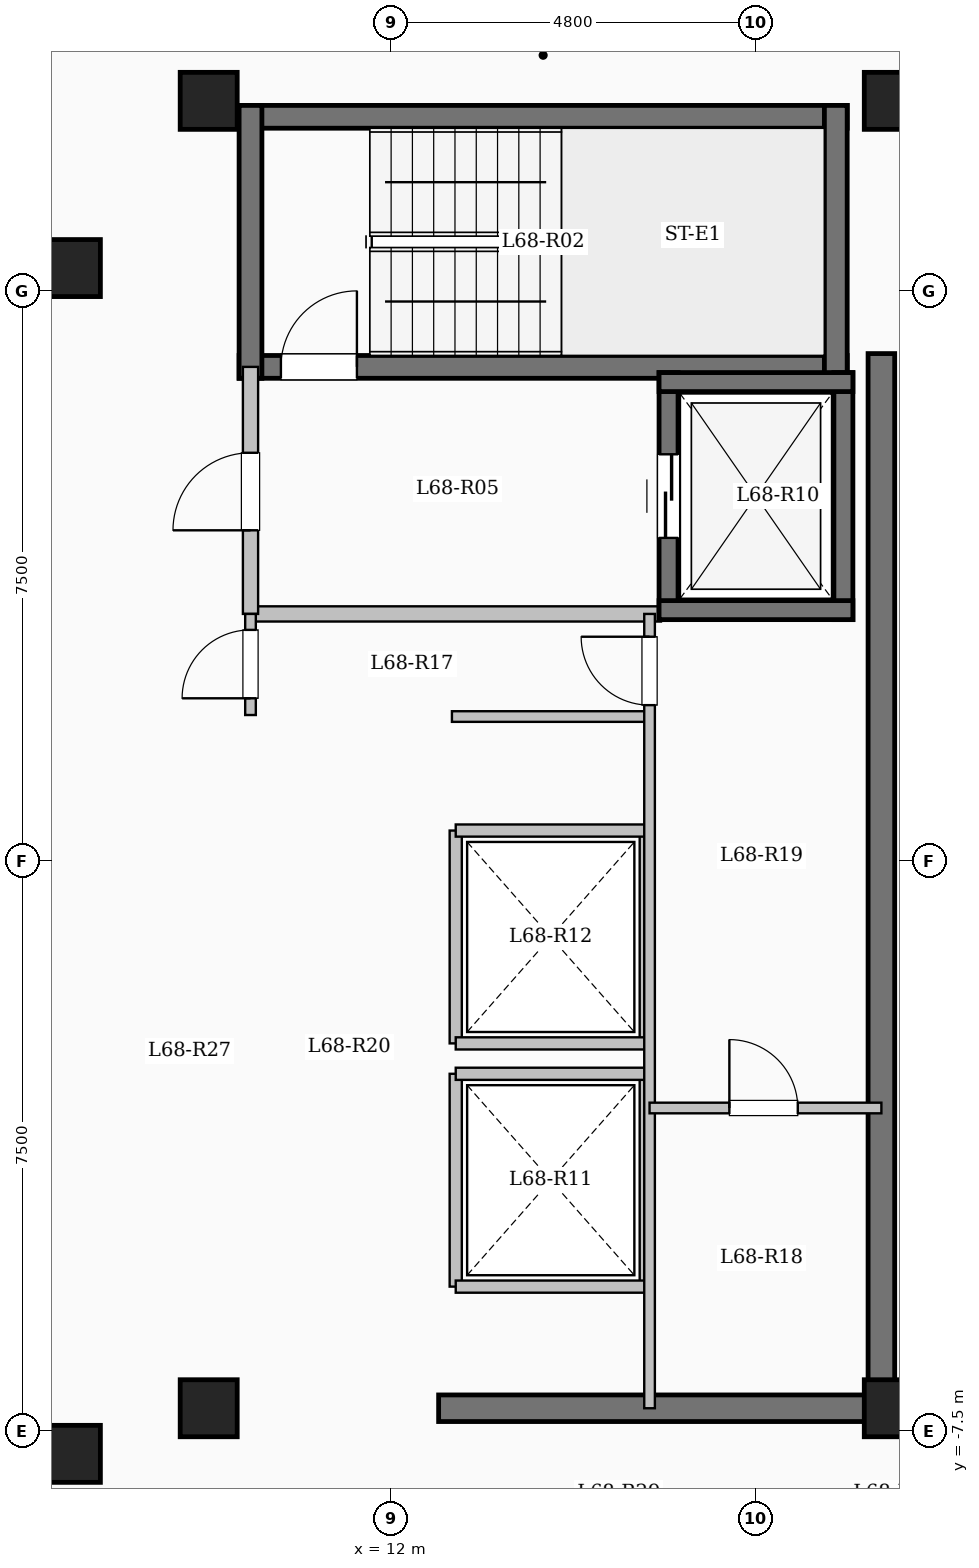
"""IFC4 building model, lengths in metres.
Left out: names, types, materials, properties, quantities, classifications, styles, units other than length and angle.
Written with IfcOpenShell. Run it as: python <this file> out.ifc"""

import sys

from ifc_helpers import new_model, si_unit, direction, frame, frame_2d, origin, origin_2d, place, context, subcontext, project, spatial, rectangle, extrude, element, fill, save


model = new_model("IFC4")
c1 = context("Model", 3, precision=1e-05, world=origin(), true_north=direction((0.0, 1.0)))
c2 = subcontext(c1, "Body", "Model", "MODEL_VIEW")
j1 = project(units=[si_unit("LENGTHUNIT", "METRE"), si_unit("PLANEANGLEUNIT", "RADIAN")], contexts=[c1])
p1 = place(None, origin())
s1 = spatial("IfcSite", under=j1, at=p1, CompositionType="ELEMENT")
p2 = place(p1, origin())
s2 = spatial("IfcBuilding", under=s1, at=p2, CompositionType="ELEMENT")
p3 = place(p2, frame((0.0, 0.0, 251.55)))
s3 = spatial("IfcBuildingStorey", under=s2, at=p3, CompositionType="ELEMENT", Elevation=251.55)
for number, where, z_axis, x_axis in (
    (1, (7.8, -7.8, 0.0), (0.0, 0.0, 1.0), (1.0, 0.0, 0.0)),
    (2, (7.8, 7.8, 0.0), (0.0, 0.0, 1.0), (1.0, 0.0, 0.0)),
    (3, (9.6, -7.2, 0.0), (0.0, 0.0, 1.0), (1.0, 0.0, 0.0)),
    (4, (9.6, 10.0, 0.0), (0.0, 0.0, 1.0), (1.0, 0.0, 0.0)),
    (5, (18.6, -7.2, 0.0), (0.0, 0.0, 1.0), (1.0, 0.0, 0.0)),
    (6, (18.6, 10.0, 0.0), (0.0, 0.0, 1.0), (1.0, 0.0, 0.0)),
):
    element("IfcColumn", number, at=place(p3, frame(where, z_axis=z_axis, x_axis=x_axis)), inside=s3, PredefinedType="COLUMN", context=c2, shape_type="SweptSolid", body=[
        extrude(rectangle(XDim=0.75, YDim=0.75, at=origin_2d()), origin(), (0.0, 0.0, 1.0), 3.35),
    ])
p4 = place(p3, frame((10.0, 9.79, 0.0), z_axis=(0.0, 0.0, 1.0), x_axis=(1.0, 0.0, 0.0)))
e7 = element("IfcWall", 7, at=p4, inside=s3, PredefinedType="SHEAR", context=c2, shape_type="SweptSolid", body=[
    extrude(rectangle(XDim=8.0, YDim=0.3, at=frame_2d((4.0, 0.0))), origin(), (0.0, 0.0, 1.0), 3.35),
])
p5 = place(p3, frame((10.0, 6.5, 0.0), z_axis=(0.0, 0.0, 1.0), x_axis=(1.0, 0.0, 0.0)))
e8 = element("IfcWall", 8, at=p5, inside=s3, PredefinedType="SHEAR", context=c2, shape_type="SweptSolid", body=[
    extrude(rectangle(XDim=8.0, YDim=0.3, at=frame_2d((4.0, 0.0))), origin(), (0.0, 0.0, 1.0), 3.35),
])
p6 = place(p5, frame((0.55, 0.0, 0.0)))
e9 = element("IfcOpeningElement", 9, at=p6, cuts=e8, PredefinedType="OPENING", context=c2, shape_type="SweptSolid", body=[
    extrude(rectangle(XDim=1.0, YDim=2.15, at=frame_2d((0.5, 1.075))), frame((0.0, 0.16, 0.0), z_axis=(0.0, -1.0, 0.0), x_axis=(1.0, 0.0, 0.0)), (0.0, 0.0, 1.0), 0.32),
])
for number, where, z_axis, x_axis in (
    (10, (10.15, 6.35, 0.0), (0.0, 0.0, 1.0), (0.0, 1.0, 0.0)),
    (11, (17.85, 6.35, 0.0), (0.0, 0.0, 1.0), (0.0, 1.0, 0.0)),
):
    element("IfcWall", number, at=place(p3, frame(where, z_axis=z_axis, x_axis=x_axis)), inside=s3, PredefinedType="SHEAR", context=c2, shape_type="SweptSolid", body=[
        extrude(rectangle(XDim=3.59, YDim=0.3, at=frame_2d((1.795, 0.0))), origin(), (0.0, 0.0, 1.0), 3.35),
    ])
p7 = place(p3, frame((10.15, 3.25, 0.0), z_axis=(0.0, 0.0, 1.0), x_axis=(1.0, 0.0, 0.0)))
e12 = element("IfcWall", 12, at=p7, inside=s3, PredefinedType="SOLIDWALL", context=c2, shape_type="SweptSolid", body=[
    extrude(rectangle(XDim=5.4, YDim=0.2, at=frame_2d((2.7, 0.0))), origin(), (0.0, 0.0, 1.0), 3.1),
])
p8 = place(p3, frame((10.15, 3.25, 0.0), z_axis=(0.0, 0.0, 1.0), x_axis=(0.0, 1.0, 0.0)))
e13 = element("IfcWall", 13, at=p8, inside=s3, PredefinedType="SOLIDWALL", context=c2, shape_type="SweptSolid", body=[
    extrude(rectangle(XDim=3.25, YDim=0.2, at=frame_2d((1.625, 0.0))), origin(), (0.0, 0.0, 1.0), 3.1),
])
p9 = place(p8, frame((1.1, 0.0, 0.0)))
e14 = element("IfcOpeningElement", 14, at=p9, cuts=e13, PredefinedType="OPENING", context=c2, shape_type="SweptSolid", body=[
    extrude(rectangle(XDim=1.02, YDim=2.15, at=frame_2d((0.51, 1.075))), frame((0.0, 0.11, 0.0), z_axis=(0.0, -1.0, 0.0), x_axis=(1.0, 0.0, 0.0)), (0.0, 0.0, 1.0), 0.22),
])
p10 = place(p3, frame((15.65, 3.175, 0.0), z_axis=(0.0, 0.0, 1.0), x_axis=(0.0, 1.0, 0.0)))
e15 = element("IfcWall", 15, at=p10, inside=s3, PredefinedType="SHEAR", context=c2, shape_type="SweptSolid", body=[
    extrude(rectangle(XDim=3.25, YDim=0.25, at=frame_2d((1.625, 0.0))), origin(), (0.0, 0.0, 1.0), 3.35),
])
p11 = place(p10, frame((1.075, 0.0, 0.0)))
e16 = element("IfcOpeningElement", 16, at=p11, cuts=e15, PredefinedType="OPENING", context=c2, shape_type="SweptSolid", body=[
    extrude(rectangle(XDim=1.1, YDim=2.15, at=frame_2d((0.55, 1.075))), frame((0.0, 0.135, 0.0), z_axis=(0.0, -1.0, 0.0), x_axis=(1.0, 0.0, 0.0)), (0.0, 0.0, 1.0), 0.27),
])
p12 = place(p3, frame((17.95, 3.175, 0.0), z_axis=(0.0, 0.0, 1.0), x_axis=(0.0, 1.0, 0.0)))
e17 = element("IfcWall", 17, at=p12, inside=s3, PredefinedType="SHEAR", context=c2, shape_type="SweptSolid", body=[
    extrude(rectangle(XDim=3.25, YDim=0.25, at=frame_2d((1.625, 0.0))), origin(), (0.0, 0.0, 1.0), 3.35),
])
for number, where, z_axis, x_axis in (
    (18, (15.525, 3.3, 0.0), (0.0, 0.0, 1.0), (1.0, 0.0, 0.0)),
    (19, (15.525, 6.3, 0.0), (0.0, 0.0, 1.0), (1.0, 0.0, 0.0)),
):
    element("IfcWall", number, at=place(p3, frame(where, z_axis=z_axis, x_axis=x_axis)), inside=s3, PredefinedType="SHEAR", context=c2, shape_type="SweptSolid", body=[
        extrude(rectangle(XDim=2.55, YDim=0.25, at=frame_2d((1.275, 0.0))), origin(), (0.0, 0.0, 1.0), 3.35),
    ])
for number, where, z_axis, x_axis in (
    (20, (12.85, -5.6, 0.0), (0.0, 0.0, 1.0), (0.0, 1.0, 0.0)),
    (21, (15.35, -5.6, 0.0), (0.0, 0.0, 1.0), (0.0, 1.0, 0.0)),
):
    element("IfcWall", number, at=place(p3, frame(where, z_axis=z_axis, x_axis=x_axis)), inside=s3, PredefinedType="SOLIDWALL", context=c2, shape_type="SweptSolid", body=[
        extrude(rectangle(XDim=2.8, YDim=0.16, at=frame_2d((1.4, 0.0))), origin(), (0.0, 0.0, 1.0), 3.1),
    ])
for number, where, z_axis, x_axis in (
    (22, (12.85, -5.6, 0.0), (0.0, 0.0, 1.0), (1.0, 0.0, 0.0)),
    (23, (12.85, -2.8, 0.0), (0.0, 0.0, 1.0), (1.0, 0.0, 0.0)),
):
    element("IfcWall", number, at=place(p3, frame(where, z_axis=z_axis, x_axis=x_axis)), inside=s3, PredefinedType="SOLIDWALL", context=c2, shape_type="SweptSolid", body=[
        extrude(rectangle(XDim=2.5, YDim=0.16, at=frame_2d((1.25, 0.0))), origin(), (0.0, 0.0, 1.0), 3.1),
    ])
for number, where, z_axis, x_axis in (
    (24, (12.85, -2.4, 0.0), (0.0, 0.0, 1.0), (0.0, 1.0, 0.0)),
    (25, (15.35, -2.4, 0.0), (0.0, 0.0, 1.0), (0.0, 1.0, 0.0)),
):
    element("IfcWall", number, at=place(p3, frame(where, z_axis=z_axis, x_axis=x_axis)), inside=s3, PredefinedType="SOLIDWALL", context=c2, shape_type="SweptSolid", body=[
        extrude(rectangle(XDim=2.8, YDim=0.16, at=frame_2d((1.4, 0.0))), origin(), (0.0, 0.0, 1.0), 3.1),
    ])
for number, where, z_axis, x_axis in (
    (26, (12.85, -2.4, 0.0), (0.0, 0.0, 1.0), (1.0, 0.0, 0.0)),
    (27, (12.85, 0.4, 0.0), (0.0, 0.0, 1.0), (1.0, 0.0, 0.0)),
):
    element("IfcWall", number, at=place(p3, frame(where, z_axis=z_axis, x_axis=x_axis)), inside=s3, PredefinedType="SOLIDWALL", context=c2, shape_type="SweptSolid", body=[
        extrude(rectangle(XDim=2.5, YDim=0.16, at=frame_2d((1.25, 0.0))), origin(), (0.0, 0.0, 1.0), 3.1),
    ])
p13 = place(p3, frame((18.45, -7.375, 0.0), z_axis=(0.0, 0.0, 1.0), x_axis=(0.0, 1.0, 0.0)))
e28 = element("IfcWall", 28, at=p13, inside=s3, PredefinedType="SHEAR", context=c2, shape_type="SweptSolid", body=[
    extrude(rectangle(XDim=14.05, YDim=0.35, at=frame_2d((7.025, 0.0))), origin(), (0.0, 0.0, 1.0), 3.35),
])
p14 = place(p3, frame((12.625, -7.2, 0.0), z_axis=(0.0, 0.0, 1.0), x_axis=(1.0, 0.0, 0.0)))
e29 = element("IfcWall", 29, at=p14, inside=s3, PredefinedType="SHEAR", context=c2, shape_type="SweptSolid", body=[
    extrude(rectangle(XDim=6.0, YDim=0.35, at=frame_2d((3.0, 0.0))), origin(), (0.0, 0.0, 1.0), 3.35),
])
p15 = place(p3, frame((12.8, 1.9, 0.0), z_axis=(0.0, 0.0, 1.0), x_axis=(1.0, 0.0, 0.0)))
e30 = element("IfcWall", 30, at=p15, inside=s3, PredefinedType="PARTITIONING", context=c2, shape_type="SweptSolid", body=[
    extrude(rectangle(XDim=2.6, YDim=0.14, at=frame_2d((1.3, 0.0))), origin(), (0.0, 0.0, 1.0), 3.1),
])
p16 = place(p3, frame((10.15, 1.92, 0.0), z_axis=(0.0, 0.0, 1.0), x_axis=(0.0, 1.0, 0.0)))
e31 = element("IfcWall", 31, at=p16, inside=s3, PredefinedType="PARTITIONING", context=c2, shape_type="SweptSolid", body=[
    extrude(rectangle(XDim=1.33, YDim=0.14, at=frame_2d((0.665, 0.0))), origin(), (0.0, 0.0, 1.0), 3.1),
])
p17 = place(p16, frame((0.22, 0.0, 0.0)))
e32 = element("IfcOpeningElement", 32, at=p17, cuts=e31, PredefinedType="OPENING", context=c2, shape_type="SweptSolid", body=[
    extrude(rectangle(XDim=0.9, YDim=2.08, at=frame_2d((0.45, 1.04))), frame((0.0, 0.08, 0.0), z_axis=(0.0, -1.0, 0.0), x_axis=(1.0, 0.0, 0.0)), (0.0, 0.0, 1.0), 0.16),
])
p18 = place(p3, frame((15.4, -7.2, 0.0), z_axis=(0.0, 0.0, 1.0), x_axis=(0.0, 1.0, 0.0)))
e33 = element("IfcWall", 33, at=p18, inside=s3, PredefinedType="PARTITIONING", context=c2, shape_type="SweptSolid", body=[
    extrude(rectangle(XDim=10.45, YDim=0.14, at=frame_2d((5.225, 0.0))), origin(), (0.0, 0.0, 1.0), 3.1),
])
p19 = place(p18, frame((9.25, 0.0, 0.0)))
e34 = element("IfcOpeningElement", 34, at=p19, cuts=e33, PredefinedType="OPENING", context=c2, shape_type="SweptSolid", body=[
    extrude(rectangle(XDim=0.9, YDim=2.08, at=frame_2d((0.45, 1.04))), frame((0.0, 0.08, 0.0), z_axis=(0.0, -1.0, 0.0), x_axis=(1.0, 0.0, 0.0)), (0.0, 0.0, 1.0), 0.16),
])
p20 = place(p3, frame((15.4, -3.25, 0.0), z_axis=(0.0, 0.0, 1.0), x_axis=(1.0, 0.0, 0.0)))
e35 = element("IfcWall", 35, at=p20, inside=s3, PredefinedType="PARTITIONING", context=c2, shape_type="SweptSolid", body=[
    extrude(rectangle(XDim=3.05, YDim=0.14, at=frame_2d((1.525, 0.0))), origin(), (0.0, 0.0, 1.0), 3.1),
])
p21 = place(p20, frame((1.05, 0.0, 0.0)))
e36 = element("IfcOpeningElement", 36, at=p21, cuts=e35, PredefinedType="OPENING", context=c2, shape_type="SweptSolid", body=[
    extrude(rectangle(XDim=0.9, YDim=2.08, at=frame_2d((0.45, 1.04))), frame((0.0, 0.08, 0.0), z_axis=(0.0, -1.0, 0.0), x_axis=(1.0, 0.0, 0.0)), (0.0, 0.0, 1.0), 0.16),
])
p22 = place(p3, frame((18.45, -7.25, 0.0), z_axis=(0.0, 0.0, 1.0), x_axis=(1.0, 0.0, 0.0)))
e37 = element("IfcWall", 37, at=p22, inside=s3, PredefinedType="PARTITIONING", context=c2, shape_type="SweptSolid", body=[
    extrude(rectangle(XDim=4.23, YDim=0.15, at=frame_2d((2.115, 0.0))), origin(), (0.0, 0.0, 1.0), 3.1),
])
p23 = place(p22, frame((1.5, 0.0, 0.0)))
e38 = element("IfcOpeningElement", 38, at=p23, cuts=e37, PredefinedType="OPENING", context=c2, shape_type="SweptSolid", body=[
    extrude(rectangle(XDim=1.08, YDim=2.15, at=frame_2d((0.54, 1.075))), frame((0.0, 0.085, 0.0), z_axis=(0.0, -1.0, 0.0), x_axis=(1.0, 0.0, 0.0)), (0.0, 0.0, 1.0), 0.17),
])
p24 = place(p6, origin())
e39 = element("IfcDoor", 39, at=p24, inside=s3, OperationType="SINGLE_SWING_RIGHT", PredefinedType="DOOR", context=c2, shape_type="SweptSolid", body=[
    extrude(rectangle(XDim=1.0, YDim=2.15, at=frame_2d((0.5, 1.075))), frame((0.0, 0.025, 0.0), z_axis=(0.0, -1.0, 0.0), x_axis=(1.0, 0.0, 0.0)), (0.0, 0.0, 1.0), 0.05),
])
fill(e9, e39)
p25 = place(p9, origin())
e40 = element("IfcDoor", 40, at=p25, inside=s3, OperationType="SINGLE_SWING_LEFT", PredefinedType="DOOR", context=c2, shape_type="SweptSolid", body=[
    extrude(rectangle(XDim=1.02, YDim=2.15, at=frame_2d((0.51, 1.075))), frame((0.0, 0.025, 0.0), z_axis=(0.0, -1.0, 0.0), x_axis=(1.0, 0.0, 0.0)), (0.0, 0.0, 1.0), 0.05),
])
fill(e14, e40)
p26 = place(p11, origin())
e41 = element("IfcDoor", 41, at=p26, inside=s3, OperationType="SLIDING_TO_LEFT", PredefinedType="DOOR", context=c2, shape_type="SweptSolid", body=[
    extrude(rectangle(XDim=1.1, YDim=2.15, at=frame_2d((0.55, 1.075))), frame((0.0, 0.025, 0.0), z_axis=(0.0, -1.0, 0.0), x_axis=(1.0, 0.0, 0.0)), (0.0, 0.0, 1.0), 0.05),
])
fill(e16, e41)
p27 = place(p17, origin())
e42 = element("IfcDoor", 42, at=p27, inside=s3, OperationType="SINGLE_SWING_LEFT", PredefinedType="DOOR", context=c2, shape_type="SweptSolid", body=[
    extrude(rectangle(XDim=0.9, YDim=2.08, at=frame_2d((0.45, 1.04))), frame((0.0, 0.025, 0.0), z_axis=(0.0, -1.0, 0.0), x_axis=(1.0, 0.0, 0.0)), (0.0, 0.0, 1.0), 0.05),
])
fill(e32, e42)
p28 = place(p19, origin())
e43 = element("IfcDoor", 43, at=p28, inside=s3, OperationType="SINGLE_SWING_RIGHT", PredefinedType="DOOR", context=c2, shape_type="SweptSolid", body=[
    extrude(rectangle(XDim=0.9, YDim=2.08, at=frame_2d((0.45, 1.04))), frame((0.0, 0.025, 0.0), z_axis=(0.0, -1.0, 0.0), x_axis=(1.0, 0.0, 0.0)), (0.0, 0.0, 1.0), 0.05),
])
fill(e34, e43)
p29 = place(p21, origin())
e44 = element("IfcDoor", 44, at=p29, inside=s3, OperationType="SINGLE_SWING_LEFT", PredefinedType="DOOR", context=c2, shape_type="SweptSolid", body=[
    extrude(rectangle(XDim=0.9, YDim=2.08, at=frame_2d((0.45, 1.04))), frame((0.0, 0.025, 0.0), z_axis=(0.0, -1.0, 0.0), x_axis=(1.0, 0.0, 0.0)), (0.0, 0.0, 1.0), 0.05),
])
fill(e36, e44)
save(model, sys.argv[1])
